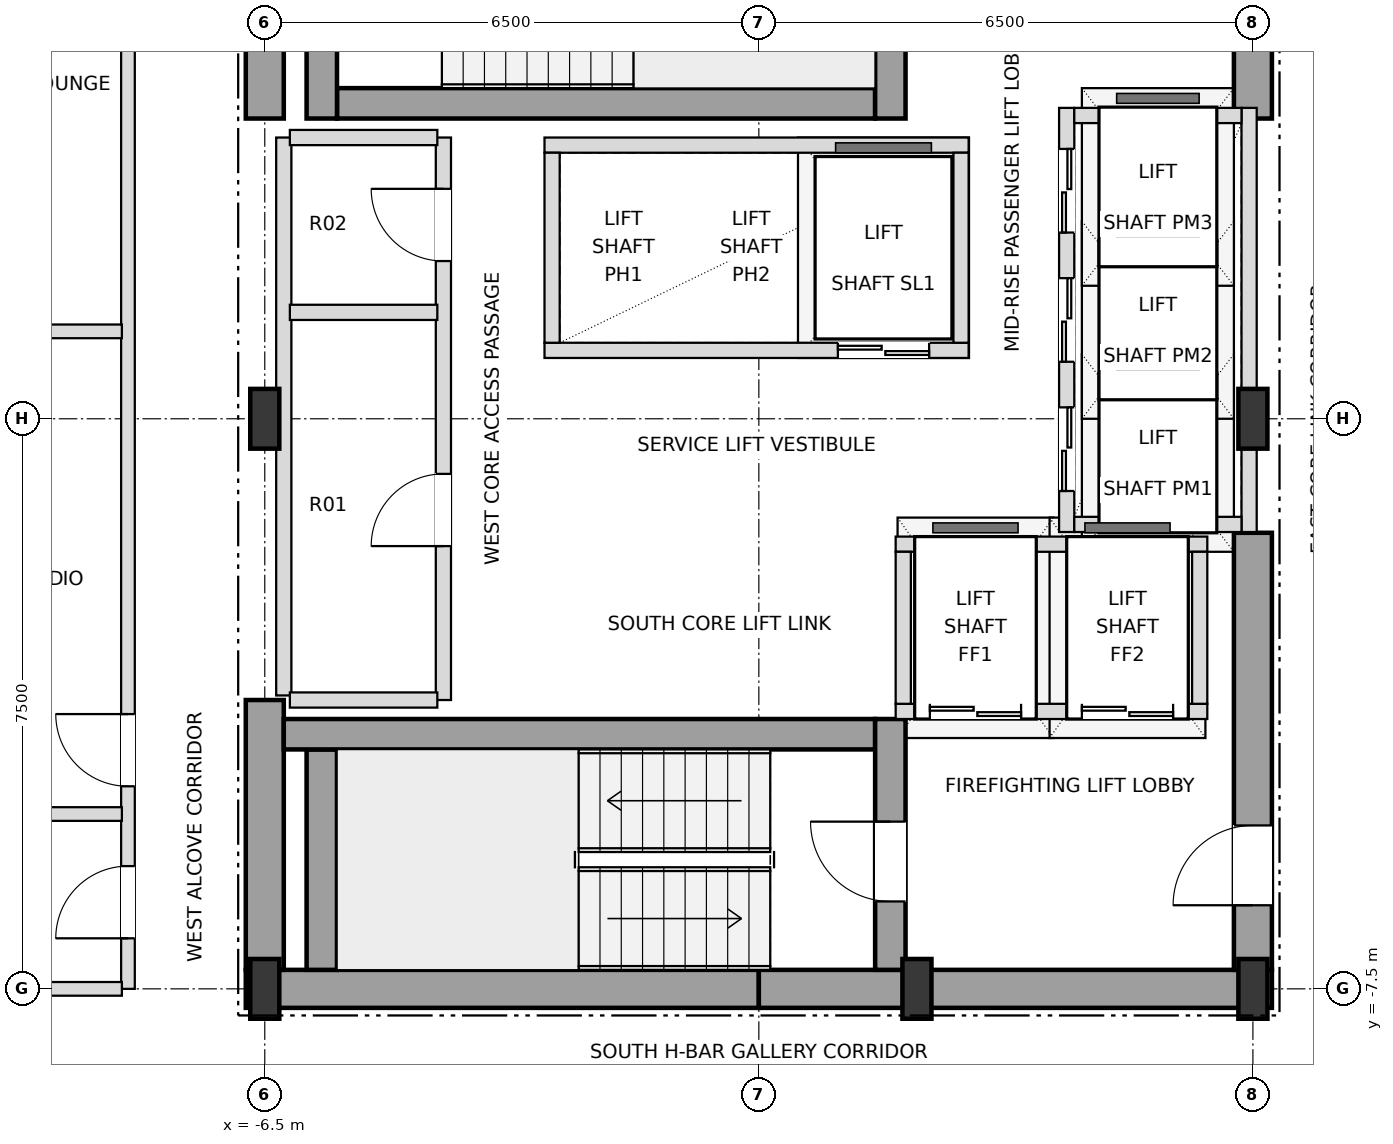
"""IFC4 building model, lengths in metres.
Left out: names, types, materials, properties, quantities, classifications, styles, units other than length and angle.
Written with IfcOpenShell. Run it as: python <this file> out.ifc"""

import sys

from ifc_helpers import new_model, si_unit, direction, frame, frame_2d, origin, origin_2d, place, context, subcontext, project, spatial, rectangle, i_section, extrude, element, fill, save


model = new_model("IFC4")
c1 = context("Model", 3, precision=1e-05, world=origin(), true_north=direction((0.0, 1.0)))
c2 = subcontext(c1, "Body", "Model", "MODEL_VIEW")
j1 = project(units=[si_unit("LENGTHUNIT", "METRE"), si_unit("PLANEANGLEUNIT", "RADIAN")], contexts=[c1])
p1 = place(None, origin())
s1 = spatial("IfcSite", under=j1, at=p1, CompositionType="ELEMENT")
p2 = place(p1, origin())
s2 = spatial("IfcBuilding", under=s1, at=p2, CompositionType="ELEMENT")
p3 = place(p2, frame((0.0, 0.0, 205.2)))
s3 = spatial("IfcBuildingStorey", under=s2, at=p3, CompositionType="ELEMENT", Elevation=205.2)
for number, where, z_axis, x_axis in (
    (1, (-6.5, -7.5, 0.0), (0.0, 0.0, 1.0), (1.0, 0.0, 0.0)),
    (2, (2.08, -7.5, 0.0), (0.0, 0.0, 1.0), (1.0, 0.0, 0.0)),
    (3, (6.5, -7.5, 0.0), (0.0, 0.0, 1.0), (1.0, 0.0, 0.0)),
    (4, (-6.5, 0.0, 0.0), (0.0, 0.0, 1.0), (1.0, 0.0, 0.0)),
    (5, (6.5, 0.0, 0.0), (0.0, 0.0, 1.0), (1.0, 0.0, 0.0)),
):
    element("IfcColumn", number, at=place(p3, frame(where, z_axis=z_axis, x_axis=x_axis)), inside=s3, PredefinedType="COLUMN", context=c2, shape_type="SweptSolid", body=[
        extrude(i_section(OverallWidth=0.382, OverallDepth=0.786, WebThickness=0.02, FlangeThickness=0.033, at=origin_2d()), origin(), (0.0, 0.0, 1.0), 3.6),
    ])
for number, where, z_axis, x_axis in (
    (6, (-6.75, -7.5, 0.0), (0.0, 0.0, 1.0), (1.0, 0.0, 0.0)),
    (7, (0.0, -7.5, 0.0), (0.0, 0.0, 1.0), (1.0, 0.0, 0.0)),
):
    element("IfcWall", number, at=place(p3, frame(where, z_axis=z_axis, x_axis=x_axis)), inside=s3, PredefinedType="SHEAR", context=c2, shape_type="SweptSolid", body=[
        extrude(rectangle(XDim=6.75, YDim=0.5, at=frame_2d((3.375, 0.0))), origin(), (0.0, 0.0, 1.0), 3.38),
    ])
p4 = place(p3, frame((-6.5, -7.25, 0.0), z_axis=(0.0, 0.0, 1.0), x_axis=(0.0, 1.0, 0.0)))
e8 = element("IfcWall", 8, at=p4, inside=s3, PredefinedType="SHEAR", context=c2, shape_type="SweptSolid", body=[
    extrude(rectangle(XDim=3.55, YDim=0.5, at=frame_2d((1.775, 0.0))), origin(), (0.0, 0.0, 1.0), 3.38),
])
p5 = place(p3, frame((-6.5, 3.95, 0.0), z_axis=(0.0, 0.0, 1.0), x_axis=(0.0, 1.0, 0.0)))
e9 = element("IfcWall", 9, at=p5, inside=s3, PredefinedType="SHEAR", context=c2, shape_type="SweptSolid", body=[
    extrude(rectangle(XDim=3.3, YDim=0.5, at=frame_2d((1.65, 0.0))), origin(), (0.0, 0.0, 1.0), 3.38),
])
p6 = place(p3, frame((6.5, -7.25, 0.0), z_axis=(0.0, 0.0, 1.0), x_axis=(0.0, 1.0, 0.0)))
e10 = element("IfcWall", 10, at=p6, inside=s3, PredefinedType="SHEAR", context=c2, shape_type="SweptSolid", body=[
    extrude(rectangle(XDim=5.75, YDim=0.5, at=frame_2d((2.875, 0.0))), origin(), (0.0, 0.0, 1.0), 3.38),
])
p7 = place(p6, frame((0.85, 0.0, 0.0)))
e11 = element("IfcOpeningElement", 11, at=p7, cuts=e10, PredefinedType="OPENING", context=c2, shape_type="SweptSolid", body=[
    extrude(rectangle(XDim=1.05, YDim=2.15, at=frame_2d((0.525, 1.075))), frame((0.0, 0.26, 0.0), z_axis=(0.0, -1.0, 0.0), x_axis=(1.0, 0.0, 0.0)), (0.0, 0.0, 1.0), 0.52),
])
p8 = place(p3, frame((6.5, 3.95, 0.0), z_axis=(0.0, 0.0, 1.0), x_axis=(0.0, 1.0, 0.0)))
e12 = element("IfcWall", 12, at=p8, inside=s3, PredefinedType="SHEAR", context=c2, shape_type="SweptSolid", body=[
    extrude(rectangle(XDim=3.3, YDim=0.5, at=frame_2d((1.65, 0.0))), origin(), (0.0, 0.0, 1.0), 3.38),
])
p9 = place(p3, frame((-5.75, -7.25, 0.0), z_axis=(0.0, 0.0, 1.0), x_axis=(0.0, 1.0, 0.0)))
e13 = element("IfcWall", 13, at=p9, inside=s3, PredefinedType="SHEAR", context=c2, shape_type="SweptSolid", body=[
    extrude(rectangle(XDim=2.9, YDim=0.4, at=frame_2d((1.45, 0.0))), origin(), (0.0, 0.0, 1.0), 3.38),
])
p10 = place(p3, frame((-6.25, -4.15, 0.0), z_axis=(0.0, 0.0, 1.0), x_axis=(1.0, 0.0, 0.0)))
e14 = element("IfcWall", 14, at=p10, inside=s3, PredefinedType="SHEAR", context=c2, shape_type="SweptSolid", body=[
    extrude(rectangle(XDim=7.78, YDim=0.4, at=frame_2d((3.89, 0.0))), origin(), (0.0, 0.0, 1.0), 3.38),
])
p11 = place(p3, frame((1.73, -7.25, 0.0), z_axis=(0.0, 0.0, 1.0), x_axis=(0.0, 1.0, 0.0)))
e15 = element("IfcWall", 15, at=p11, inside=s3, PredefinedType="SHEAR", context=c2, shape_type="SweptSolid", body=[
    extrude(rectangle(XDim=3.3, YDim=0.4, at=frame_2d((1.65, 0.0))), origin(), (0.0, 0.0, 1.0), 3.38),
])
p12 = place(p11, frame((0.9, 0.0, 0.0)))
e16 = element("IfcOpeningElement", 16, at=p12, cuts=e15, PredefinedType="OPENING", context=c2, shape_type="SweptSolid", body=[
    extrude(rectangle(XDim=1.05, YDim=2.15, at=frame_2d((0.525, 1.075))), frame((0.0, 0.21, 0.0), z_axis=(0.0, -1.0, 0.0), x_axis=(1.0, 0.0, 0.0)), (0.0, 0.0, 1.0), 0.42),
])
p13 = place(p3, frame((-5.55, 4.15, 0.0), z_axis=(0.0, 0.0, 1.0), x_axis=(1.0, 0.0, 0.0)))
e17 = element("IfcWall", 17, at=p13, inside=s3, PredefinedType="SHEAR", context=c2, shape_type="SweptSolid", body=[
    extrude(rectangle(XDim=7.08, YDim=0.4, at=frame_2d((3.54, 0.0))), origin(), (0.0, 0.0, 1.0), 3.38),
])
for number, where, z_axis, x_axis in (
    (18, (1.73, 3.95, 0.0), (0.0, 0.0, 1.0), (0.0, 1.0, 0.0)),
    (19, (-5.75, 3.95, 0.0), (0.0, 0.0, 1.0), (0.0, 1.0, 0.0)),
):
    element("IfcWall", number, at=place(p3, frame(where, z_axis=z_axis, x_axis=x_axis)), inside=s3, PredefinedType="SHEAR", context=c2, shape_type="SweptSolid", body=[
        extrude(rectangle(XDim=3.3, YDim=0.4, at=frame_2d((1.65, 0.0))), origin(), (0.0, 0.0, 1.0), 3.38),
    ])
p14 = place(p3, frame((4.05, -1.49, 0.0), z_axis=(0.0, 0.0, 1.0), x_axis=(0.0, 1.0, 0.0)))
e20 = element("IfcWall", 20, at=p14, inside=s3, PredefinedType="SOLIDWALL", context=c2, shape_type="SweptSolid", body=[
    extrude(rectangle(XDim=5.58, YDim=0.2, at=frame_2d((2.79, 0.0))), origin(), (0.0, 0.0, 1.0), 3.38),
])
p15 = place(p14, frame((0.54, 0.0, 0.0)))
e21 = element("IfcOpeningElement", 21, at=p15, cuts=e20, PredefinedType="OPENING", context=c2, shape_type="SweptSolid", body=[
    extrude(rectangle(XDim=1.1, YDim=2.15, at=frame_2d((0.55, 1.075))), frame((0.0, 0.11, 0.0), z_axis=(0.0, -1.0, 0.0), x_axis=(1.0, 0.0, 0.0)), (0.0, 0.0, 1.0), 0.22),
])
p16 = place(p14, frame((2.24, 0.0, 0.0)))
e22 = element("IfcOpeningElement", 22, at=p16, cuts=e20, PredefinedType="OPENING", context=c2, shape_type="SweptSolid", body=[
    extrude(rectangle(XDim=1.1, YDim=2.15, at=frame_2d((0.55, 1.075))), frame((0.0, 0.11, 0.0), z_axis=(0.0, -1.0, 0.0), x_axis=(1.0, 0.0, 0.0)), (0.0, 0.0, 1.0), 0.22),
])
p17 = place(p14, frame((3.94, 0.0, 0.0)))
e23 = element("IfcOpeningElement", 23, at=p17, cuts=e20, PredefinedType="OPENING", context=c2, shape_type="SweptSolid", body=[
    extrude(rectangle(XDim=1.1, YDim=2.15, at=frame_2d((0.55, 1.075))), frame((0.0, 0.11, 0.0), z_axis=(0.0, -1.0, 0.0), x_axis=(1.0, 0.0, 0.0)), (0.0, 0.0, 1.0), 0.22),
])
p18 = place(p3, frame((6.45, -1.49, 0.0), z_axis=(0.0, 0.0, 1.0), x_axis=(0.0, 1.0, 0.0)))
e24 = element("IfcWall", 24, at=p18, inside=s3, PredefinedType="SOLIDWALL", context=c2, shape_type="SweptSolid", body=[
    extrude(rectangle(XDim=5.58, YDim=0.2, at=frame_2d((2.79, 0.0))), origin(), (0.0, 0.0, 1.0), 2.826),
])
for number, where, z_axis, x_axis in (
    (25, (4.15, -1.39, 0.0), (0.0, 0.0, 1.0), (1.0, 0.0, 0.0)),
    (26, (4.15, 3.99, 0.0), (0.0, 0.0, 1.0), (1.0, 0.0, 0.0)),
):
    element("IfcWall", number, at=place(p3, frame(where, z_axis=z_axis, x_axis=x_axis)), inside=s3, PredefinedType="SOLIDWALL", context=c2, shape_type="SweptSolid", body=[
        extrude(rectangle(XDim=2.2, YDim=0.2, at=frame_2d((1.1, 0.0))), origin(), (0.0, 0.0, 1.0), 3.38),
    ])
p19 = place(p3, frame((-2.82, 0.9, 0.0), z_axis=(0.0, 0.0, 1.0), x_axis=(1.0, 0.0, 0.0)))
e27 = element("IfcWall", 27, at=p19, inside=s3, PredefinedType="SOLIDWALL", context=c2, shape_type="SweptSolid", body=[
    extrude(rectangle(XDim=5.58, YDim=0.2, at=frame_2d((2.79, 0.0))), origin(), (0.0, 0.0, 1.0), 3.38),
])
p20 = place(p19, frame((3.86, 0.0, 0.0)))
e28 = element("IfcOpeningElement", 28, at=p20, cuts=e27, PredefinedType="OPENING", context=c2, shape_type="SweptSolid", body=[
    extrude(rectangle(XDim=1.2, YDim=2.2, at=frame_2d((0.6, 1.1))), frame((0.0, 0.11, 0.0), z_axis=(0.0, -1.0, 0.0), x_axis=(1.0, 0.0, 0.0)), (0.0, 0.0, 1.0), 0.22),
])
p21 = place(p3, frame((-2.82, 3.6, 0.0), z_axis=(0.0, 0.0, 1.0), x_axis=(1.0, 0.0, 0.0)))
e29 = element("IfcWall", 29, at=p21, inside=s3, PredefinedType="SOLIDWALL", context=c2, shape_type="SweptSolid", body=[
    extrude(rectangle(XDim=5.58, YDim=0.2, at=frame_2d((2.79, 0.0))), origin(), (0.0, 0.0, 1.0), 3.38),
])
for number, where, z_axis, x_axis in (
    (30, (-2.72, 1.0, 0.0), (0.0, 0.0, 1.0), (0.0, 1.0, 0.0)),
    (31, (2.66, 1.0, 0.0), (0.0, 0.0, 1.0), (0.0, 1.0, 0.0)),
):
    element("IfcWall", number, at=place(p3, frame(where, z_axis=z_axis, x_axis=x_axis)), inside=s3, PredefinedType="SOLIDWALL", context=c2, shape_type="SweptSolid", body=[
        extrude(rectangle(XDim=2.5, YDim=0.2, at=frame_2d((1.25, 0.0))), origin(), (0.0, 0.0, 1.0), 3.38),
    ])
p22 = place(p3, frame((1.8, -3.85, 0.0), z_axis=(0.0, 0.0, 1.0), x_axis=(1.0, 0.0, 0.0)))
e32 = element("IfcWall", 32, at=p22, inside=s3, PredefinedType="SOLIDWALL", context=c2, shape_type="SweptSolid", body=[
    extrude(rectangle(XDim=4.1, YDim=0.2, at=frame_2d((2.05, 0.0))), origin(), (0.0, 0.0, 1.0), 3.38),
])
p23 = place(p22, frame((0.45, 0.0, 0.0)))
e33 = element("IfcOpeningElement", 33, at=p23, cuts=e32, PredefinedType="OPENING", context=c2, shape_type="SweptSolid", body=[
    extrude(rectangle(XDim=1.2, YDim=2.2, at=frame_2d((0.6, 1.1))), frame((0.0, 0.11, 0.0), z_axis=(0.0, -1.0, 0.0), x_axis=(1.0, 0.0, 0.0)), (0.0, 0.0, 1.0), 0.22),
])
p24 = place(p22, frame((2.45, 0.0, 0.0)))
e34 = element("IfcOpeningElement", 34, at=p24, cuts=e32, PredefinedType="OPENING", context=c2, shape_type="SweptSolid", body=[
    extrude(rectangle(XDim=1.2, YDim=2.2, at=frame_2d((0.6, 1.1))), frame((0.0, 0.11, 0.0), z_axis=(0.0, -1.0, 0.0), x_axis=(1.0, 0.0, 0.0)), (0.0, 0.0, 1.0), 0.22),
])
p25 = place(p3, frame((1.8, -1.65, 0.0), z_axis=(0.0, 0.0, 1.0), x_axis=(1.0, 0.0, 0.0)))
e35 = element("IfcWall", 35, at=p25, inside=s3, PredefinedType="SOLIDWALL", context=c2, shape_type="SweptSolid", body=[
    extrude(rectangle(XDim=4.1, YDim=0.2, at=frame_2d((2.05, 0.0))), origin(), (0.0, 0.0, 1.0), 3.38),
])
for number, where, z_axis, x_axis in (
    (36, (1.9, -3.75, 0.0), (0.0, 0.0, 1.0), (0.0, 1.0, 0.0)),
    (37, (5.8, -3.75, 0.0), (0.0, 0.0, 1.0), (0.0, 1.0, 0.0)),
):
    element("IfcWall", number, at=place(p3, frame(where, z_axis=z_axis, x_axis=x_axis)), inside=s3, PredefinedType="SOLIDWALL", context=c2, shape_type="SweptSolid", body=[
        extrude(rectangle(XDim=2.0, YDim=0.2, at=frame_2d((1.0, 0.0))), origin(), (0.0, 0.0, 1.0), 3.38),
    ])
p26 = place(p3, frame((-8.3, -7.5, 0.0), z_axis=(0.0, 0.0, 1.0), x_axis=(0.0, 1.0, 0.0)))
e38 = element("IfcWall", 38, at=p26, inside=s3, PredefinedType="PARTITIONING", context=c2, shape_type="SweptSolid", body=[
    extrude(rectangle(XDim=15.0, YDim=0.18, at=frame_2d((7.5, 0.0))), origin(), (0.0, 0.0, 1.0), 3.38),
])
p27 = place(p26, frame((0.665, 0.0, 0.0)))
e39 = element("IfcOpeningElement", 39, at=p27, cuts=e38, PredefinedType="OPENING", context=c2, shape_type="SweptSolid", body=[
    extrude(rectangle(XDim=0.95, YDim=2.15, at=frame_2d((0.475, 1.075))), frame((0.0, 0.1, 0.0), z_axis=(0.0, -1.0, 0.0), x_axis=(1.0, 0.0, 0.0)), (0.0, 0.0, 1.0), 0.2),
])
p28 = place(p26, frame((2.665, 0.0, 0.0)))
e40 = element("IfcOpeningElement", 40, at=p28, cuts=e38, PredefinedType="OPENING", context=c2, shape_type="SweptSolid", body=[
    extrude(rectangle(XDim=0.95, YDim=2.15, at=frame_2d((0.475, 1.075))), frame((0.0, 0.1, 0.0), z_axis=(0.0, -1.0, 0.0), x_axis=(1.0, 0.0, 0.0)), (0.0, 0.0, 1.0), 0.2),
])
p29 = place(p3, frame((-6.25, -3.64, 0.0), z_axis=(0.0, 0.0, 1.0), x_axis=(0.0, 1.0, 0.0)))
e41 = element("IfcWall", 41, at=p29, inside=s3, PredefinedType="SOLIDWALL", context=c2, shape_type="SweptSolid", body=[
    extrude(rectangle(XDim=7.34, YDim=0.2, at=frame_2d((3.67, 0.0))), origin(), (0.0, 0.0, 1.0), 3.38),
])
p30 = place(p3, frame((-4.15, -3.7, 0.0), z_axis=(0.0, 0.0, 1.0), x_axis=(0.0, 1.0, 0.0)))
e42 = element("IfcWall", 42, at=p30, inside=s3, PredefinedType="SOLIDWALL", context=c2, shape_type="SweptSolid", body=[
    extrude(rectangle(XDim=7.4, YDim=0.2, at=frame_2d((3.7, 0.0))), origin(), (0.0, 0.0, 1.0), 3.38),
])
p31 = place(p30, frame((2.025, 0.0, 0.0)))
e43 = element("IfcOpeningElement", 43, at=p31, cuts=e42, PredefinedType="OPENING", context=c2, shape_type="SweptSolid", body=[
    extrude(rectangle(XDim=0.95, YDim=2.15, at=frame_2d((0.475, 1.075))), frame((0.0, 0.11, 0.0), z_axis=(0.0, -1.0, 0.0), x_axis=(1.0, 0.0, 0.0)), (0.0, 0.0, 1.0), 0.22),
])
p32 = place(p30, frame((5.775, 0.0, 0.0)))
e44 = element("IfcOpeningElement", 44, at=p32, cuts=e42, PredefinedType="OPENING", context=c2, shape_type="SweptSolid", body=[
    extrude(rectangle(XDim=0.95, YDim=2.15, at=frame_2d((0.475, 1.075))), frame((0.0, 0.11, 0.0), z_axis=(0.0, -1.0, 0.0), x_axis=(1.0, 0.0, 0.0)), (0.0, 0.0, 1.0), 0.22),
])
p33 = place(p3, frame((-18.4, -7.5, 0.0), z_axis=(0.0, 0.0, 1.0), x_axis=(1.0, 0.0, 0.0)))
e45 = element("IfcWall", 45, at=p33, inside=s3, PredefinedType="PARTITIONING", context=c2, shape_type="SweptSolid", body=[
    extrude(rectangle(XDim=10.02, YDim=0.18, at=frame_2d((5.01, 0.0))), origin(), (0.0, 0.0, 1.0), 2.826),
])
p34 = place(p3, frame((-18.32, -5.2, 0.0), z_axis=(0.0, 0.0, 1.0), x_axis=(1.0, 0.0, 0.0)))
e46 = element("IfcWall", 46, at=p34, inside=s3, PredefinedType="PARTITIONING", context=c2, shape_type="SweptSolid", body=[
    extrude(rectangle(XDim=9.94, YDim=0.18, at=frame_2d((4.97, 0.0))), origin(), (0.0, 0.0, 1.0), 2.826),
])
p35 = place(p3, frame((-6.17, -3.7, 0.0), z_axis=(0.0, 0.0, 1.0), x_axis=(1.0, 0.0, 0.0)))
e47 = element("IfcWall", 47, at=p35, inside=s3, PredefinedType="SOLIDWALL", context=c2, shape_type="SweptSolid", body=[
    extrude(rectangle(XDim=1.94, YDim=0.2, at=frame_2d((0.97, 0.0))), origin(), (0.0, 0.0, 1.0), 3.38),
])
p36 = place(p3, frame((-18.32, 1.15, 0.0), z_axis=(0.0, 0.0, 1.0), x_axis=(1.0, 0.0, 0.0)))
e48 = element("IfcWall", 48, at=p36, inside=s3, PredefinedType="PARTITIONING", context=c2, shape_type="SweptSolid", body=[
    extrude(rectangle(XDim=9.94, YDim=0.18, at=frame_2d((4.97, 0.0))), origin(), (0.0, 0.0, 1.0), 2.826),
])
p37 = place(p36, frame((4.495, 0.0, 0.0)))
e49 = element("IfcOpeningElement", 49, at=p37, cuts=e48, PredefinedType="OPENING", context=c2, shape_type="SweptSolid", body=[
    extrude(rectangle(XDim=0.95, YDim=2.15, at=frame_2d((0.475, 1.075))), frame((0.0, 0.1, 0.0), z_axis=(0.0, -1.0, 0.0), x_axis=(1.0, 0.0, 0.0)), (0.0, 0.0, 1.0), 0.2),
])
for number, where, z_axis, x_axis in (
    (50, (-6.17, 1.4, 0.0), (0.0, 0.0, 1.0), (1.0, 0.0, 0.0)),
    (51, (-6.17, 3.7, 0.0), (0.0, 0.0, 1.0), (1.0, 0.0, 0.0)),
):
    element("IfcWall", number, at=place(p3, frame(where, z_axis=z_axis, x_axis=x_axis)), inside=s3, PredefinedType="SOLIDWALL", context=c2, shape_type="SweptSolid", body=[
        extrude(rectangle(XDim=1.94, YDim=0.2, at=frame_2d((0.97, 0.0))), origin(), (0.0, 0.0, 1.0), 3.38),
    ])
p38 = place(p7, origin())
e52 = element("IfcDoor", 52, at=p38, inside=s3, OperationType="SINGLE_SWING_LEFT", PredefinedType="DOOR", context=c2, shape_type="SweptSolid", body=[
    extrude(rectangle(XDim=1.05, YDim=2.15, at=frame_2d((0.525, 1.075))), frame((0.0, 0.025, 0.0), z_axis=(0.0, -1.0, 0.0), x_axis=(1.0, 0.0, 0.0)), (0.0, 0.0, 1.0), 0.05),
])
fill(e11, e52)
p39 = place(p12, origin())
e53 = element("IfcDoor", 53, at=p39, inside=s3, OperationType="SINGLE_SWING_RIGHT", PredefinedType="DOOR", context=c2, shape_type="SweptSolid", body=[
    extrude(rectangle(XDim=1.05, YDim=2.15, at=frame_2d((0.525, 1.075))), frame((0.0, 0.025, 0.0), z_axis=(0.0, -1.0, 0.0), x_axis=(1.0, 0.0, 0.0)), (0.0, 0.0, 1.0), 0.05),
])
fill(e16, e53)
p40 = place(p15, origin())
e54 = element("IfcDoor", 54, at=p40, inside=s3, OperationType="DOUBLE_DOOR_SLIDING", PredefinedType="DOOR", context=c2, shape_type="SweptSolid", body=[
    extrude(rectangle(XDim=1.1, YDim=2.15, at=frame_2d((0.55, 1.075))), frame((0.0, 0.025, 0.0), z_axis=(0.0, -1.0, 0.0), x_axis=(1.0, 0.0, 0.0)), (0.0, 0.0, 1.0), 0.05),
])
fill(e21, e54)
p41 = place(p16, origin())
e55 = element("IfcDoor", 55, at=p41, inside=s3, OperationType="DOUBLE_DOOR_SLIDING", PredefinedType="DOOR", context=c2, shape_type="SweptSolid", body=[
    extrude(rectangle(XDim=1.1, YDim=2.15, at=frame_2d((0.55, 1.075))), frame((0.0, 0.025, 0.0), z_axis=(0.0, -1.0, 0.0), x_axis=(1.0, 0.0, 0.0)), (0.0, 0.0, 1.0), 0.05),
])
fill(e22, e55)
p42 = place(p17, origin())
e56 = element("IfcDoor", 56, at=p42, inside=s3, OperationType="DOUBLE_DOOR_SLIDING", PredefinedType="DOOR", context=c2, shape_type="SweptSolid", body=[
    extrude(rectangle(XDim=1.1, YDim=2.15, at=frame_2d((0.55, 1.075))), frame((0.0, 0.025, 0.0), z_axis=(0.0, -1.0, 0.0), x_axis=(1.0, 0.0, 0.0)), (0.0, 0.0, 1.0), 0.05),
])
fill(e23, e56)
p43 = place(p20, origin())
e57 = element("IfcDoor", 57, at=p43, inside=s3, OperationType="DOUBLE_DOOR_SLIDING", PredefinedType="DOOR", context=c2, shape_type="SweptSolid", body=[
    extrude(rectangle(XDim=1.2, YDim=2.2, at=frame_2d((0.6, 1.1))), frame((0.0, 0.025, 0.0), z_axis=(0.0, -1.0, 0.0), x_axis=(1.0, 0.0, 0.0)), (0.0, 0.0, 1.0), 0.05),
])
fill(e28, e57)
p44 = place(p23, origin())
e58 = element("IfcDoor", 58, at=p44, inside=s3, OperationType="DOUBLE_DOOR_SLIDING", PredefinedType="DOOR", context=c2, shape_type="SweptSolid", body=[
    extrude(rectangle(XDim=1.2, YDim=2.2, at=frame_2d((0.6, 1.1))), frame((0.0, 0.025, 0.0), z_axis=(0.0, -1.0, 0.0), x_axis=(1.0, 0.0, 0.0)), (0.0, 0.0, 1.0), 0.05),
])
fill(e33, e58)
p45 = place(p24, origin())
e59 = element("IfcDoor", 59, at=p45, inside=s3, OperationType="DOUBLE_DOOR_SLIDING", PredefinedType="DOOR", context=c2, shape_type="SweptSolid", body=[
    extrude(rectangle(XDim=1.2, YDim=2.2, at=frame_2d((0.6, 1.1))), frame((0.0, 0.025, 0.0), z_axis=(0.0, -1.0, 0.0), x_axis=(1.0, 0.0, 0.0)), (0.0, 0.0, 1.0), 0.05),
])
fill(e34, e59)
p46 = place(p31, origin())
e60 = element("IfcDoor", 60, at=p46, inside=s3, OperationType="SINGLE_SWING_LEFT", PredefinedType="DOOR", context=c2, shape_type="SweptSolid", body=[
    extrude(rectangle(XDim=0.95, YDim=2.15, at=frame_2d((0.475, 1.075))), frame((0.0, 0.025, 0.0), z_axis=(0.0, -1.0, 0.0), x_axis=(1.0, 0.0, 0.0)), (0.0, 0.0, 1.0), 0.05),
])
fill(e43, e60)
p47 = place(p32, origin())
e61 = element("IfcDoor", 61, at=p47, inside=s3, OperationType="SINGLE_SWING_RIGHT", PredefinedType="DOOR", context=c2, shape_type="SweptSolid", body=[
    extrude(rectangle(XDim=0.95, YDim=2.15, at=frame_2d((0.475, 1.075))), frame((0.0, 0.025, 0.0), z_axis=(0.0, -1.0, 0.0), x_axis=(1.0, 0.0, 0.0)), (0.0, 0.0, 1.0), 0.05),
])
fill(e44, e61)
p48 = place(p27, origin())
e62 = element("IfcDoor", 62, at=p48, inside=s3, OperationType="SINGLE_SWING_LEFT", PredefinedType="DOOR", context=c2, shape_type="SweptSolid", body=[
    extrude(rectangle(XDim=0.95, YDim=2.15, at=frame_2d((0.475, 1.075))), frame((0.0, 0.025, 0.0), z_axis=(0.0, -1.0, 0.0), x_axis=(1.0, 0.0, 0.0)), (0.0, 0.0, 1.0), 0.05),
])
fill(e39, e62)
p49 = place(p28, origin())
e63 = element("IfcDoor", 63, at=p49, inside=s3, OperationType="SINGLE_SWING_RIGHT", PredefinedType="DOOR", context=c2, shape_type="SweptSolid", body=[
    extrude(rectangle(XDim=0.95, YDim=2.15, at=frame_2d((0.475, 1.075))), frame((0.0, 0.025, 0.0), z_axis=(0.0, -1.0, 0.0), x_axis=(1.0, 0.0, 0.0)), (0.0, 0.0, 1.0), 0.05),
])
fill(e40, e63)
save(model, sys.argv[1])
